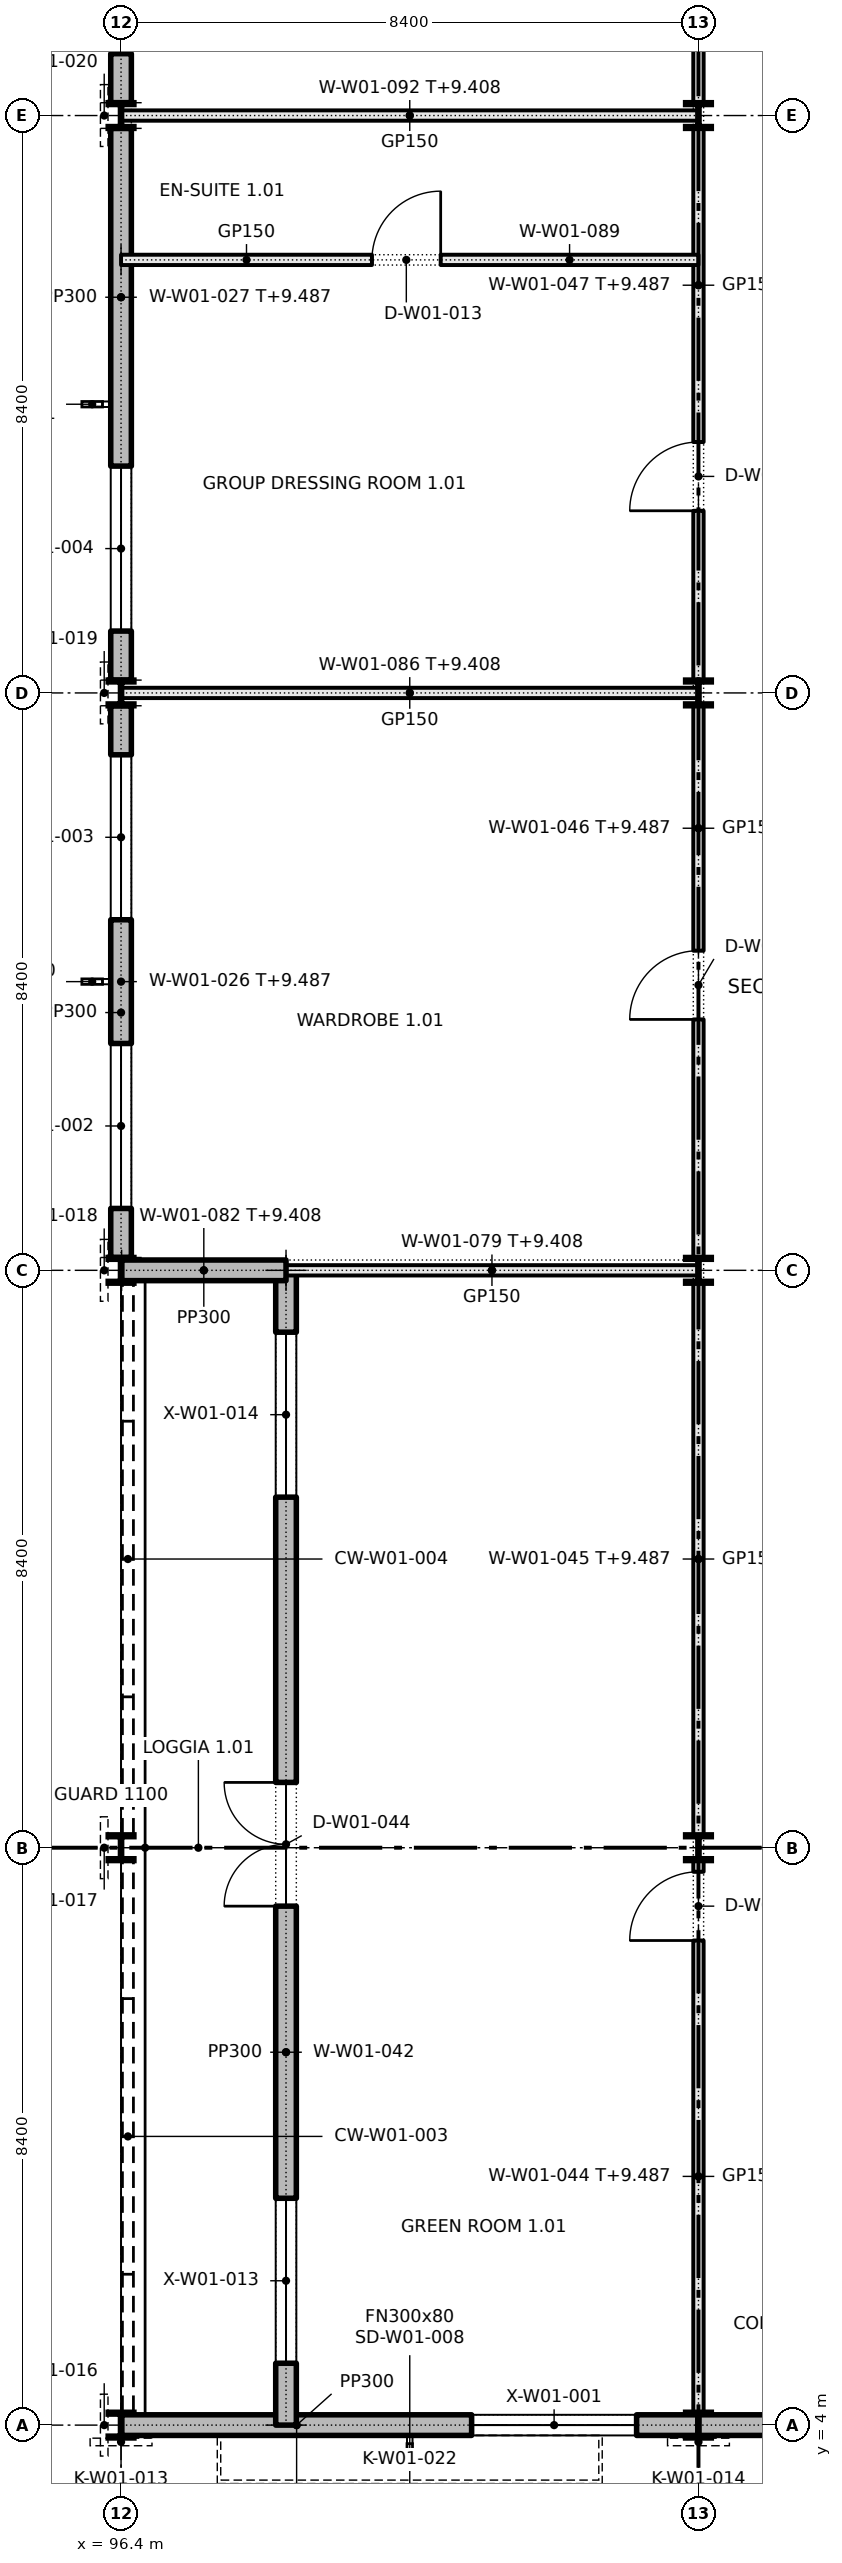
"""IFC4 building model, lengths in metres.
Left out: names, types, materials, properties, quantities, classifications, styles, units other than length and angle.
Written with IfcOpenShell. Run it as: python <this file> out.ifc"""

import sys

from ifc_helpers import new_model, si_unit, direction, frame, frame_2d, origin, origin_2d, place, context, subcontext, project, spatial, rectangle, i_section, extrude, element, fill, save


model = new_model("IFC4")
c1 = context("Model", 3, precision=1e-05, world=origin(), true_north=direction((0.0, 1.0)))
c2 = subcontext(c1, "Body", "Model", "MODEL_VIEW")
j1 = project(units=[si_unit("LENGTHUNIT", "METRE"), si_unit("PLANEANGLEUNIT", "RADIAN")], contexts=[c1])
p1 = place(None, origin())
s1 = spatial("IfcSite", under=j1, at=p1, CompositionType="ELEMENT")
p2 = place(p1, origin())
s2 = spatial("IfcBuilding", under=s1, at=p2, CompositionType="ELEMENT")
p3 = place(p2, frame((0.0, 0.0, 5.4)))
s3 = spatial("IfcBuildingStorey", under=s2, at=p3, CompositionType="ELEMENT", Elevation=5.4)
for number, where, z_axis, x_axis in (
    (1, (96.4, 4.0, 0.0), (0.0, 0.0, 1.0), (1.0, 0.0, 0.0)),
    (2, (96.4, 12.4, 0.0), (0.0, 0.0, 1.0), (1.0, 0.0, 0.0)),
    (3, (96.4, 20.8, 0.0), (0.0, 0.0, 1.0), (1.0, 0.0, 0.0)),
    (4, (96.4, 29.2, 0.0), (0.0, 0.0, 1.0), (1.0, 0.0, 0.0)),
    (5, (96.4, 37.6, 0.0), (0.0, 0.0, 1.0), (1.0, 0.0, 0.0)),
    (6, (104.8, 4.0, 0.0), (0.0, 0.0, 1.0), (1.0, 0.0, 0.0)),
    (7, (104.8, 12.4, 0.0), (0.0, 0.0, 1.0), (1.0, 0.0, 0.0)),
    (8, (104.8, 20.8, 0.0), (0.0, 0.0, 1.0), (1.0, 0.0, 0.0)),
    (9, (104.8, 29.2, 0.0), (0.0, 0.0, 1.0), (1.0, 0.0, 0.0)),
    (10, (104.8, 37.6, 0.0), (0.0, 0.0, 1.0), (1.0, 0.0, 0.0)),
):
    element("IfcColumn", number, at=place(p3, frame(where, z_axis=z_axis, x_axis=x_axis)), inside=s3, PredefinedType="COLUMN", context=c2, shape_type="SweptSolid", body=[
        extrude(i_section(OverallWidth=0.373, OverallDepth=0.373, WebThickness=0.016, FlangeThickness=0.026, FilletRadius=0.015, at=origin_2d()), origin(), (0.0, 0.0, 1.0), 4.8),
    ])
p4 = place(p3, frame((96.4, 20.987, 0.0), z_axis=(0.0, 0.0, 1.0), x_axis=(0.0, 1.0, 0.0)))
e11 = element("IfcWall", 11, at=p4, inside=s3, PredefinedType="SOLIDWALL", context=c2, shape_type="SweptSolid", body=[
    extrude(rectangle(XDim=8.027, YDim=0.3, at=frame_2d((4.013, 0.0))), origin(), (0.0, 0.0, 1.0), 4.087),
])
p5 = place(p4, frame((0.713, 0.0, 0.95)))
e12 = element("IfcOpeningElement", 12, at=p5, cuts=e11, PredefinedType="OPENING", context=c2, shape_type="SweptSolid", body=[
    extrude(rectangle(XDim=2.4, YDim=1.8, at=frame_2d((1.2, 0.9))), frame((0.0, 0.16, 0.0), z_axis=(0.0, -1.0, 0.0), x_axis=(1.0, 0.0, 0.0)), (0.0, 0.0, 1.0), 0.32),
])
p6 = place(p4, frame((4.913, 0.0, 0.95)))
e13 = element("IfcOpeningElement", 13, at=p6, cuts=e11, PredefinedType="OPENING", context=c2, shape_type="SweptSolid", body=[
    extrude(rectangle(XDim=2.4, YDim=1.8, at=frame_2d((1.2, 0.9))), frame((0.0, 0.16, 0.0), z_axis=(0.0, -1.0, 0.0), x_axis=(1.0, 0.0, 0.0)), (0.0, 0.0, 1.0), 0.32),
])
p7 = place(p3, frame((96.4, 29.387, 0.0), z_axis=(0.0, 0.0, 1.0), x_axis=(0.0, 1.0, 0.0)))
e14 = element("IfcWall", 14, at=p7, inside=s3, PredefinedType="SOLIDWALL", context=c2, shape_type="SweptSolid", body=[
    extrude(rectangle(XDim=8.027, YDim=0.3, at=frame_2d((4.013, 0.0))), origin(), (0.0, 0.0, 1.0), 4.087),
])
p8 = place(p7, frame((0.713, 0.0, 0.95)))
e15 = element("IfcOpeningElement", 15, at=p8, cuts=e14, PredefinedType="OPENING", context=c2, shape_type="SweptSolid", body=[
    extrude(rectangle(XDim=2.4, YDim=1.8, at=frame_2d((1.2, 0.9))), frame((0.0, 0.16, 0.0), z_axis=(0.0, -1.0, 0.0), x_axis=(1.0, 0.0, 0.0)), (0.0, 0.0, 1.0), 0.32),
])
p9 = place(p3, frame((96.4, 37.787, 0.0), z_axis=(0.0, 0.0, 1.0), x_axis=(0.0, 1.0, 0.0)))
e16 = element("IfcWall", 16, at=p9, inside=s3, PredefinedType="SOLIDWALL", context=c2, shape_type="SweptSolid", body=[
    extrude(rectangle(XDim=8.027, YDim=0.3, at=frame_2d((4.013, 0.0))), origin(), (0.0, 0.0, 1.0), 4.087),
])
p10 = place(p9, frame((0.713, 0.0, 0.95)))
e17 = element("IfcOpeningElement", 17, at=p10, cuts=e16, PredefinedType="OPENING", context=c2, shape_type="SweptSolid", body=[
    extrude(rectangle(XDim=2.4, YDim=1.8, at=frame_2d((1.2, 0.9))), frame((0.0, 0.16, 0.0), z_axis=(0.0, -1.0, 0.0), x_axis=(1.0, 0.0, 0.0)), (0.0, 0.0, 1.0), 0.32),
])
p11 = place(p3, frame((96.408, 4.0, 0.0), z_axis=(0.0, 0.0, 1.0), x_axis=(1.0, 0.0, 0.0)))
e18 = element("IfcWall", 18, at=p11, inside=s3, PredefinedType="SOLIDWALL", context=c2, shape_type="SweptSolid", body=[
    extrude(rectangle(XDim=8.4, YDim=0.3, at=frame_2d((4.2, 0.0))), origin(), (0.0, 0.0, 1.0), 4.008),
])
p12 = place(p11, frame((5.092, 0.0, 0.95)))
e19 = element("IfcOpeningElement", 19, at=p12, cuts=e18, PredefinedType="OPENING", context=c2, shape_type="SweptSolid", body=[
    extrude(rectangle(XDim=2.4, YDim=1.8, at=frame_2d((1.2, 0.9))), frame((0.0, 0.16, 0.0), z_axis=(0.0, -1.0, 0.0), x_axis=(1.0, 0.0, 0.0)), (0.0, 0.0, 1.0), 0.32),
])
p13 = place(p3, frame((104.792, 4.0, 0.0), z_axis=(0.0, 0.0, 1.0), x_axis=(1.0, 0.0, 0.0)))
e20 = element("IfcWall", 20, at=p13, inside=s3, PredefinedType="SOLIDWALL", context=c2, shape_type="SweptSolid", body=[
    extrude(rectangle(XDim=8.4, YDim=0.3, at=frame_2d((4.2, 0.0))), origin(), (0.0, 0.0, 1.0), 4.008),
])
p14 = place(p3, frame((98.8, 4.0, 0.0), z_axis=(0.0, 0.0, 1.0), x_axis=(0.0, 1.0, 0.0)))
e21 = element("IfcWall", 21, at=p14, inside=s3, PredefinedType="SOLIDWALL", context=c2, shape_type="SweptSolid", body=[
    extrude(rectangle(XDim=16.8, YDim=0.3, at=frame_2d((8.4, 0.0))), origin(), (0.0, 0.0, 1.0), 4.8),
])
p15 = place(p14, frame((7.55, 0.0, 0.0)))
e22 = element("IfcOpeningElement", 22, at=p15, cuts=e21, PredefinedType="OPENING", context=c2, shape_type="SweptSolid", body=[
    extrude(rectangle(XDim=1.8, YDim=2.1, at=frame_2d((0.9, 1.05))), frame((0.0, 0.16, 0.0), z_axis=(0.0, -1.0, 0.0), x_axis=(1.0, 0.0, 0.0)), (0.0, 0.0, 1.0), 0.32),
])
p16 = place(p14, frame((0.9, 0.0, 0.95)))
e23 = element("IfcOpeningElement", 23, at=p16, cuts=e21, PredefinedType="OPENING", context=c2, shape_type="SweptSolid", body=[
    extrude(rectangle(XDim=2.4, YDim=1.8, at=frame_2d((1.2, 0.9))), frame((0.0, 0.16, 0.0), z_axis=(0.0, -1.0, 0.0), x_axis=(1.0, 0.0, 0.0)), (0.0, 0.0, 1.0), 0.32),
])
p17 = place(p14, frame((13.5, 0.0, 0.95)))
e24 = element("IfcOpeningElement", 24, at=p17, cuts=e21, PredefinedType="OPENING", context=c2, shape_type="SweptSolid", body=[
    extrude(rectangle(XDim=2.4, YDim=1.8, at=frame_2d((1.2, 0.9))), frame((0.0, 0.16, 0.0), z_axis=(0.0, -1.0, 0.0), x_axis=(1.0, 0.0, 0.0)), (0.0, 0.0, 1.0), 0.32),
])
p18 = place(p3, frame((104.8, 4.187, 0.0), z_axis=(0.0, 0.0, 1.0), x_axis=(0.0, 1.0, 0.0)))
e25 = element("IfcWall", 25, at=p18, inside=s3, PredefinedType="PARTITIONING", context=c2, shape_type="SweptSolid", body=[
    extrude(rectangle(XDim=8.027, YDim=0.15, at=frame_2d((4.013, 0.0))), origin(), (0.0, 0.0, 1.0), 4.087),
])
p19 = place(p18, frame((6.863, 0.0, 0.0)))
e26 = element("IfcOpeningElement", 26, at=p19, cuts=e25, PredefinedType="OPENING", context=c2, shape_type="SweptSolid", body=[
    extrude(rectangle(XDim=1.0, YDim=2.1, at=frame_2d((0.5, 1.05))), frame((0.0, 0.085, 0.0), z_axis=(0.0, -1.0, 0.0), x_axis=(1.0, 0.0, 0.0)), (0.0, 0.0, 1.0), 0.17),
])
p20 = place(p3, frame((104.8, 12.587, 0.0), z_axis=(0.0, 0.0, 1.0), x_axis=(0.0, 1.0, 0.0)))
e27 = element("IfcWall", 27, at=p20, inside=s3, PredefinedType="PARTITIONING", context=c2, shape_type="SweptSolid", body=[
    extrude(rectangle(XDim=8.027, YDim=0.15, at=frame_2d((4.013, 0.0))), origin(), (0.0, 0.0, 1.0), 4.087),
])
p21 = place(p3, frame((104.8, 20.987, 0.0), z_axis=(0.0, 0.0, 1.0), x_axis=(0.0, 1.0, 0.0)))
e28 = element("IfcWall", 28, at=p21, inside=s3, PredefinedType="PARTITIONING", context=c2, shape_type="SweptSolid", body=[
    extrude(rectangle(XDim=8.027, YDim=0.15, at=frame_2d((4.013, 0.0))), origin(), (0.0, 0.0, 1.0), 4.087),
])
p22 = place(p21, frame((3.463, 0.0, 0.0)))
e29 = element("IfcOpeningElement", 29, at=p22, cuts=e28, PredefinedType="OPENING", context=c2, shape_type="SweptSolid", body=[
    extrude(rectangle(XDim=1.0, YDim=2.1, at=frame_2d((0.5, 1.05))), frame((0.0, 0.085, 0.0), z_axis=(0.0, -1.0, 0.0), x_axis=(1.0, 0.0, 0.0)), (0.0, 0.0, 1.0), 0.17),
])
p23 = place(p3, frame((104.8, 29.387, 0.0), z_axis=(0.0, 0.0, 1.0), x_axis=(0.0, 1.0, 0.0)))
e30 = element("IfcWall", 30, at=p23, inside=s3, PredefinedType="PARTITIONING", context=c2, shape_type="SweptSolid", body=[
    extrude(rectangle(XDim=8.027, YDim=0.15, at=frame_2d((4.013, 0.0))), origin(), (0.0, 0.0, 1.0), 4.087),
])
p24 = place(p23, frame((2.463, 0.0, 0.0)))
e31 = element("IfcOpeningElement", 31, at=p24, cuts=e30, PredefinedType="OPENING", context=c2, shape_type="SweptSolid", body=[
    extrude(rectangle(XDim=1.0, YDim=2.1, at=frame_2d((0.5, 1.05))), frame((0.0, 0.085, 0.0), z_axis=(0.0, -1.0, 0.0), x_axis=(1.0, 0.0, 0.0)), (0.0, 0.0, 1.0), 0.17),
])
p25 = place(p3, frame((104.8, 37.787, 0.0), z_axis=(0.0, 0.0, 1.0), x_axis=(0.0, 1.0, 0.0)))
e32 = element("IfcWall", 32, at=p25, inside=s3, PredefinedType="PARTITIONING", context=c2, shape_type="SweptSolid", body=[
    extrude(rectangle(XDim=8.027, YDim=0.15, at=frame_2d((4.013, 0.0))), origin(), (0.0, 0.0, 1.0), 4.087),
])
p26 = place(p25, frame((2.463, 0.0, 0.0)))
e33 = element("IfcOpeningElement", 33, at=p26, cuts=e32, PredefinedType="OPENING", context=c2, shape_type="SweptSolid", body=[
    extrude(rectangle(XDim=1.0, YDim=2.1, at=frame_2d((0.5, 1.05))), frame((0.0, 0.085, 0.0), z_axis=(0.0, -1.0, 0.0), x_axis=(1.0, 0.0, 0.0)), (0.0, 0.0, 1.0), 0.17),
])
p27 = place(p3, frame((98.8, 20.8, 0.0), z_axis=(0.0, 0.0, 1.0), x_axis=(1.0, 0.0, 0.0)))
e34 = element("IfcWall", 34, at=p27, inside=s3, PredefinedType="PARTITIONING", context=c2, shape_type="SweptSolid", body=[
    extrude(rectangle(XDim=5.992, YDim=0.15, at=frame_2d((2.996, 0.0))), origin(), (0.0, 0.0, 1.0), 4.008),
])
p28 = place(p3, frame((96.408, 20.8, 0.0), z_axis=(0.0, 0.0, 1.0), x_axis=(1.0, 0.0, 0.0)))
e35 = element("IfcWall", 35, at=p28, inside=s3, PredefinedType="SOLIDWALL", context=c2, shape_type="SweptSolid", body=[
    extrude(rectangle(XDim=2.392, YDim=0.3, at=frame_2d((1.196, 0.0))), origin(), (0.0, 0.0, 1.0), 4.008),
])
p29 = place(p3, frame((96.408, 29.2, 0.0), z_axis=(0.0, 0.0, 1.0), x_axis=(1.0, 0.0, 0.0)))
e36 = element("IfcWall", 36, at=p29, inside=s3, PredefinedType="PARTITIONING", context=c2, shape_type="SweptSolid", body=[
    extrude(rectangle(XDim=8.384, YDim=0.15, at=frame_2d((4.192, 0.0))), origin(), (0.0, 0.0, 1.0), 4.008),
])
p30 = place(p3, frame((96.4, 35.5, 0.0), z_axis=(0.0, 0.0, 1.0), x_axis=(1.0, 0.0, 0.0)))
e37 = element("IfcWall", 37, at=p30, inside=s3, PredefinedType="PARTITIONING", context=c2, shape_type="SweptSolid", body=[
    extrude(rectangle(XDim=8.4, YDim=0.15, at=frame_2d((4.2, 0.0))), origin(), (0.0, 0.0, 1.0), 4.8),
])
p31 = place(p30, frame((3.65, 0.0, 0.0)))
e38 = element("IfcOpeningElement", 38, at=p31, cuts=e37, PredefinedType="OPENING", context=c2, shape_type="SweptSolid", body=[
    extrude(rectangle(XDim=1.0, YDim=2.1, at=frame_2d((0.5, 1.05))), frame((0.0, 0.085, 0.0), z_axis=(0.0, -1.0, 0.0), x_axis=(1.0, 0.0, 0.0)), (0.0, 0.0, 1.0), 0.17),
])
p32 = place(p3, frame((96.408, 37.6, 0.0), z_axis=(0.0, 0.0, 1.0), x_axis=(1.0, 0.0, 0.0)))
e39 = element("IfcWall", 39, at=p32, inside=s3, PredefinedType="PARTITIONING", context=c2, shape_type="SweptSolid", body=[
    extrude(rectangle(XDim=8.384, YDim=0.15, at=frame_2d((4.192, 0.0))), origin(), (0.0, 0.0, 1.0), 4.008),
])
p33 = place(p12, origin())
e40 = element("IfcWindow", 40, at=p33, inside=s3, PartitioningType="DOUBLE_PANEL_VERTICAL", PredefinedType="WINDOW", context=c2, shape_type="SweptSolid", body=[
    extrude(rectangle(XDim=2.4, YDim=1.8, at=frame_2d((1.2, 0.9))), frame((0.0, 0.03, 0.0), z_axis=(0.0, -1.0, 0.0), x_axis=(1.0, 0.0, 0.0)), (0.0, 0.0, 1.0), 0.06),
])
fill(e19, e40)
p34 = place(p5, origin())
e41 = element("IfcWindow", 41, at=p34, inside=s3, PartitioningType="DOUBLE_PANEL_VERTICAL", PredefinedType="WINDOW", context=c2, shape_type="SweptSolid", body=[
    extrude(rectangle(XDim=2.4, YDim=1.8, at=frame_2d((1.2, 0.9))), frame((0.0, 0.03, 0.0), z_axis=(0.0, -1.0, 0.0), x_axis=(1.0, 0.0, 0.0)), (0.0, 0.0, 1.0), 0.06),
])
fill(e12, e41)
p35 = place(p6, origin())
e42 = element("IfcWindow", 42, at=p35, inside=s3, PartitioningType="DOUBLE_PANEL_VERTICAL", PredefinedType="WINDOW", context=c2, shape_type="SweptSolid", body=[
    extrude(rectangle(XDim=2.4, YDim=1.8, at=frame_2d((1.2, 0.9))), frame((0.0, 0.03, 0.0), z_axis=(0.0, -1.0, 0.0), x_axis=(1.0, 0.0, 0.0)), (0.0, 0.0, 1.0), 0.06),
])
fill(e13, e42)
p36 = place(p8, origin())
e43 = element("IfcWindow", 43, at=p36, inside=s3, PartitioningType="DOUBLE_PANEL_VERTICAL", PredefinedType="WINDOW", context=c2, shape_type="SweptSolid", body=[
    extrude(rectangle(XDim=2.4, YDim=1.8, at=frame_2d((1.2, 0.9))), frame((0.0, 0.03, 0.0), z_axis=(0.0, -1.0, 0.0), x_axis=(1.0, 0.0, 0.0)), (0.0, 0.0, 1.0), 0.06),
])
fill(e15, e43)
p37 = place(p10, origin())
e44 = element("IfcWindow", 44, at=p37, inside=s3, PartitioningType="DOUBLE_PANEL_VERTICAL", PredefinedType="WINDOW", context=c2, shape_type="SweptSolid", body=[
    extrude(rectangle(XDim=2.4, YDim=1.8, at=frame_2d((1.2, 0.9))), frame((0.0, 0.03, 0.0), z_axis=(0.0, -1.0, 0.0), x_axis=(1.0, 0.0, 0.0)), (0.0, 0.0, 1.0), 0.06),
])
fill(e17, e44)
p38 = place(p19, origin())
e45 = element("IfcDoor", 45, at=p38, inside=s3, OperationType="SINGLE_SWING_LEFT", PredefinedType="DOOR", context=c2, shape_type="SweptSolid", body=[
    extrude(rectangle(XDim=1.0, YDim=2.1, at=frame_2d((0.5, 1.05))), frame((0.0, 0.025, 0.0), z_axis=(0.0, -1.0, 0.0), x_axis=(1.0, 0.0, 0.0)), (0.0, 0.0, 1.0), 0.05),
])
fill(e26, e45)
p39 = place(p22, origin())
e46 = element("IfcDoor", 46, at=p39, inside=s3, OperationType="SINGLE_SWING_LEFT", PredefinedType="DOOR", context=c2, shape_type="SweptSolid", body=[
    extrude(rectangle(XDim=1.0, YDim=2.1, at=frame_2d((0.5, 1.05))), frame((0.0, 0.025, 0.0), z_axis=(0.0, -1.0, 0.0), x_axis=(1.0, 0.0, 0.0)), (0.0, 0.0, 1.0), 0.05),
])
fill(e29, e46)
p40 = place(p24, origin())
e47 = element("IfcDoor", 47, at=p40, inside=s3, OperationType="SINGLE_SWING_LEFT", PredefinedType="DOOR", context=c2, shape_type="SweptSolid", body=[
    extrude(rectangle(XDim=1.0, YDim=2.1, at=frame_2d((0.5, 1.05))), frame((0.0, 0.025, 0.0), z_axis=(0.0, -1.0, 0.0), x_axis=(1.0, 0.0, 0.0)), (0.0, 0.0, 1.0), 0.05),
])
fill(e31, e47)
p41 = place(p31, origin())
e48 = element("IfcDoor", 48, at=p41, inside=s3, OperationType="SINGLE_SWING_RIGHT", PredefinedType="DOOR", context=c2, shape_type="SweptSolid", body=[
    extrude(rectangle(XDim=1.0, YDim=2.1, at=frame_2d((0.5, 1.05))), frame((0.0, 0.025, 0.0), z_axis=(0.0, -1.0, 0.0), x_axis=(1.0, 0.0, 0.0)), (0.0, 0.0, 1.0), 0.05),
])
fill(e38, e48)
p42 = place(p15, origin())
e49 = element("IfcDoor", 49, at=p42, inside=s3, OperationType="DOUBLE_DOOR_SINGLE_SWING", PredefinedType="DOOR", context=c2, shape_type="SweptSolid", body=[
    extrude(rectangle(XDim=1.8, YDim=2.1, at=frame_2d((0.9, 1.05))), frame((0.0, 0.025, 0.0), z_axis=(0.0, -1.0, 0.0), x_axis=(1.0, 0.0, 0.0)), (0.0, 0.0, 1.0), 0.05),
])
fill(e22, e49)
p43 = place(p16, origin())
e50 = element("IfcWindow", 50, at=p43, inside=s3, PartitioningType="DOUBLE_PANEL_VERTICAL", PredefinedType="WINDOW", context=c2, shape_type="SweptSolid", body=[
    extrude(rectangle(XDim=2.4, YDim=1.8, at=frame_2d((1.2, 0.9))), frame((0.0, 0.03, 0.0), z_axis=(0.0, -1.0, 0.0), x_axis=(1.0, 0.0, 0.0)), (0.0, 0.0, 1.0), 0.06),
])
fill(e23, e50)
p44 = place(p17, origin())
e51 = element("IfcWindow", 51, at=p44, inside=s3, PartitioningType="DOUBLE_PANEL_VERTICAL", PredefinedType="WINDOW", context=c2, shape_type="SweptSolid", body=[
    extrude(rectangle(XDim=2.4, YDim=1.8, at=frame_2d((1.2, 0.9))), frame((0.0, 0.03, 0.0), z_axis=(0.0, -1.0, 0.0), x_axis=(1.0, 0.0, 0.0)), (0.0, 0.0, 1.0), 0.06),
])
fill(e24, e51)
save(model, sys.argv[1])
